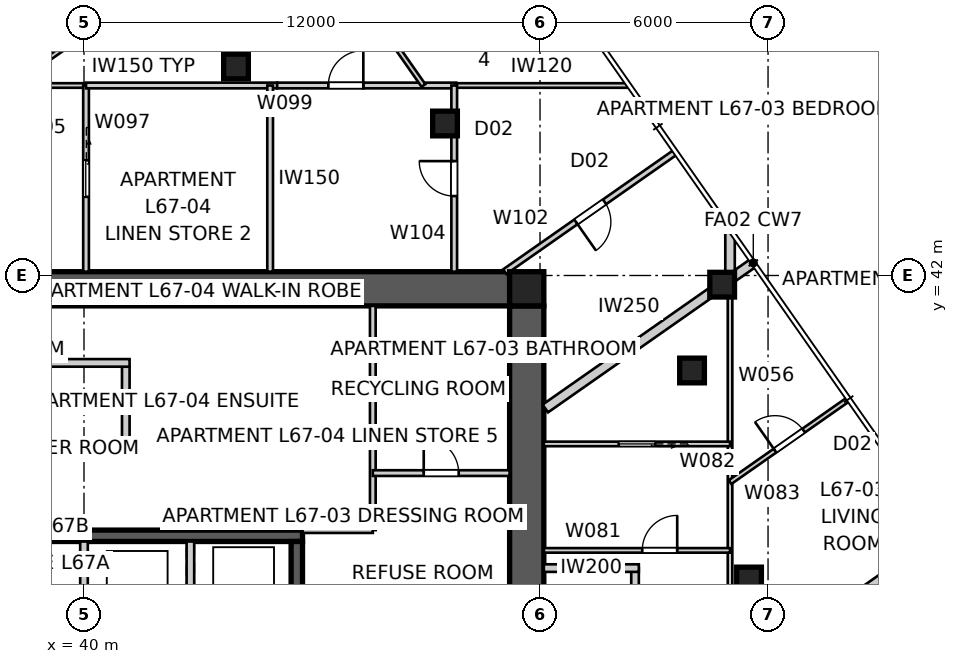
"""IFC4 building model, lengths in metres.
Left out: names, types, materials, properties, quantities, classifications, styles, units other than length and angle.
Written with IfcOpenShell. Run it as: python <this file> out.ifc"""

import sys

from ifc_helpers import new_model, si_unit, direction, frame, frame_2d, origin, origin_2d, place, context, subcontext, project, spatial, polyline, rectangle, outline, extrude, element, fill, save


model = new_model("IFC4")
c1 = context("Model", 3, precision=1e-05, world=origin(), true_north=direction((0.0, 1.0)))
c2 = subcontext(c1, "Body", "Model", "MODEL_VIEW")
j1 = project(units=[si_unit("LENGTHUNIT", "METRE"), si_unit("PLANEANGLEUNIT", "RADIAN")], contexts=[c1])
p1 = place(None, origin())
s1 = spatial("IfcSite", under=j1, at=p1, CompositionType="ELEMENT")
p2 = place(p1, origin())
s2 = spatial("IfcBuilding", under=s1, at=p2, CompositionType="ELEMENT")
p3 = place(p2, frame((0.0, 0.0, 243.8)))
s3 = spatial("IfcBuildingStorey", under=s2, at=p3, CompositionType="ELEMENT", Elevation=243.8)
p4 = place(p3, frame((28.8, 41.65, 0.0), z_axis=(0.0, 0.0, 1.0), x_axis=(1.0, 0.0, 0.0)))
e1 = element("IfcWall", 1, at=p4, inside=s3, PredefinedType="SHEAR", context=c2, shape_type="SweptSolid", body=[
    extrude(outline(polyline([(0.0, -0.45), (22.4, -0.45), (22.4, -0.025), (22.85, -0.025), (22.85, 0.025), (22.4, 0.025), (22.4, 0.45), (0.0, 0.45), (0.0, 0.025), (-0.45, 0.025), (-0.45, -0.025), (0.0, -0.025), (0.0, -0.45)])), origin(), (0.0, 0.0, 1.0), 3.4),
])
p5 = place(p3, frame((51.65, 18.8, 0.0), z_axis=(0.0, 0.0, 1.0), x_axis=(0.0, 1.0, 0.0)))
e2 = element("IfcWall", 2, at=p5, inside=s3, PredefinedType="SHEAR", context=c2, shape_type="SweptSolid", body=[
    extrude(outline(polyline([(0.0, -0.45), (22.4, -0.45), (22.4, -0.025), (22.85, -0.025), (22.85, 0.025), (22.4, 0.025), (22.4, 0.45), (0.0, 0.45), (0.0, 0.025), (-0.45, 0.025), (-0.45, -0.025), (0.0, -0.025), (0.0, -0.45)])), origin(), (0.0, 0.0, 1.0), 3.4),
])
p6 = place(p5, frame((11.14, 0.0, 0.0)))
e3 = element("IfcOpeningElement", 3, at=p6, cuts=e2, PredefinedType="OPENING", context=c2, shape_type="SweptSolid", body=[
    extrude(rectangle(XDim=1.02, YDim=2.4, at=frame_2d((0.51, 1.2))), frame((0.0, 0.46, 0.0), z_axis=(0.0, -1.0, 0.0), x_axis=(1.0, 0.0, 0.0)), (0.0, 0.0, 1.0), 0.92),
])
p7 = place(p3, frame((34.25, 35.15, 0.0), z_axis=(0.0, 0.0, 1.0), x_axis=(1.0, 0.0, 0.0)))
e4 = element("IfcWall", 4, at=p7, inside=s3, PredefinedType="SHEAR", context=c2, shape_type="SweptSolid", body=[
    extrude(rectangle(XDim=11.5, YDim=0.3, at=frame_2d((5.75, 0.0))), origin(), (0.0, 0.0, 1.0), 3.4),
])
for number, where, z_axis, x_axis in (
    (5, (40.0, 32.2, 0.0), (0.0, 0.0, 1.0), (0.0, 1.0, 0.0)),
    (6, (42.8, 32.2, 0.0), (0.0, 0.0, 1.0), (0.0, 1.0, 0.0)),
):
    element("IfcWall", number, at=place(p3, frame(where, z_axis=z_axis, x_axis=x_axis)), inside=s3, PredefinedType="SOLIDWALL", context=c2, shape_type="SweptSolid", body=[
        extrude(rectangle(XDim=2.8, YDim=0.2, at=frame_2d((1.4, 0.0))), origin(), (0.0, 0.0, 1.0), 3.4),
    ])
p8 = place(p3, frame((45.6, 32.2, 0.0), z_axis=(0.0, 0.0, 1.0), x_axis=(0.0, 1.0, 0.0)))
e7 = element("IfcWall", 7, at=p8, inside=s3, PredefinedType="SHEAR", context=c2, shape_type="SweptSolid", body=[
    extrude(rectangle(XDim=2.8, YDim=0.3, at=frame_2d((1.4, 0.0))), origin(), (0.0, 0.0, 1.0), 3.4),
])
p9 = place(p3, frame((41.1, 37.6, 0.0), z_axis=(0.0, 0.0, 1.0), x_axis=(0.0, 1.0, 0.0)))
e8 = element("IfcWall", 8, at=p9, inside=s3, PredefinedType="SOLIDWALL", context=c2, shape_type="SweptSolid", body=[
    extrude(rectangle(XDim=2.0, YDim=0.2, at=frame_2d((1.0, 0.0))), origin(), (0.0, 0.0, 1.0), 3.4),
])
for number, where, z_axis, x_axis in (
    (9, (38.8, 37.5, 0.0), (0.0, 0.0, 1.0), (1.0, 0.0, 0.0)),
    (10, (38.8, 39.7, 0.0), (0.0, 0.0, 1.0), (1.0, 0.0, 0.0)),
):
    element("IfcWall", number, at=place(p3, frame(where, z_axis=z_axis, x_axis=x_axis)), inside=s3, PredefinedType="SOLIDWALL", context=c2, shape_type="SweptSolid", body=[
        extrude(rectangle(XDim=2.4, YDim=0.2, at=frame_2d((1.2, 0.0))), origin(), (0.0, 0.0, 1.0), 3.4),
    ])
p10 = place(p3, frame((51.65, 41.65, 0.0), z_axis=(0.0, 0.0, 1.0), x_axis=(1.0, 0.0, 0.0)))
e11 = element("IfcColumn", 11, at=p10, inside=s3, PredefinedType="COLUMN", context=c2, shape_type="SweptSolid", body=[
    extrude(rectangle(XDim=0.9, YDim=0.9, at=origin_2d()), origin(), (0.0, 0.0, 1.0), 3.4),
])
for number, where, z_axis, x_axis in (
    (12, (56.793, 41.758, 0.0), (0.0, 0.0, 1.0), (1.0, 0.0, 0.0)),
    (13, (57.5, 34.0, 0.0), (0.0, 0.0, 1.0), (1.0, 0.0, 0.0)),
    (14, (56.0, 39.5, 0.0), (0.0, 0.0, 1.0), (1.0, 0.0, 0.0)),
    (15, (49.5, 46.0, 0.0), (0.0, 0.0, 1.0), (1.0, 0.0, 0.0)),
    (16, (44.0, 47.5, 0.0), (0.0, 0.0, 1.0), (1.0, 0.0, 0.0)),
):
    element("IfcColumn", number, at=place(p3, frame(where, z_axis=z_axis, x_axis=x_axis)), inside=s3, PredefinedType="COLUMN", context=c2, shape_type="SweptSolid", body=[
        extrude(rectangle(XDim=0.65, YDim=0.65, at=origin_2d()), origin(), (0.0, 0.0, 1.0), 3.4),
    ])
p11 = place(p3, frame((54.5, 25.7, 0.0), z_axis=(0.0, 0.0, 1.0), x_axis=(0.0, 1.0, 0.0)))
e17 = element("IfcWall", 17, at=p11, inside=s3, PredefinedType="PARTITIONING", context=c2, shape_type="SweptSolid", body=[
    extrude(rectangle(XDim=8.6, YDim=0.2, at=frame_2d((4.3, 0.0))), origin(), (0.0, 0.0, 1.0), 3.25),
])
p12 = place(p11, frame((5.438, 0.0, 0.0)))
e18 = element("IfcOpeningElement", 18, at=p12, cuts=e17, PredefinedType="OPENING", context=c2, shape_type="SweptSolid", body=[
    extrude(rectangle(XDim=1.02, YDim=2.34, at=frame_2d((0.51, 1.17))), frame((0.0, 0.11, 0.0), z_axis=(0.0, -1.0, 0.0), x_axis=(1.0, 0.0, 0.0)), (0.0, 0.0, 1.0), 0.22),
])
p13 = place(p11, frame((1.543, 0.0, 0.0)))
e19 = element("IfcOpeningElement", 19, at=p13, cuts=e17, PredefinedType="OPENING", context=c2, shape_type="SweptSolid", body=[
    extrude(rectangle(XDim=1.02, YDim=2.34, at=frame_2d((0.51, 1.17))), frame((0.0, 0.11, 0.0), z_axis=(0.0, -1.0, 0.0), x_axis=(1.0, 0.0, 0.0)), (0.0, 0.0, 1.0), 0.22),
])
p14 = place(p3, frame((52.1, 34.3, 0.0), z_axis=(0.0, 0.0, 1.0), x_axis=(1.0, 0.0, 0.0)))
e20 = element("IfcWall", 20, at=p14, inside=s3, PredefinedType="PARTITIONING", context=c2, shape_type="SweptSolid", body=[
    extrude(rectangle(XDim=2.5, YDim=0.2, at=frame_2d((1.25, 0.0))), origin(), (0.0, 0.0, 1.0), 3.25),
])
p15 = place(p3, frame((57.612, 42.332, 0.0), z_axis=(0.0, 0.0, 1.0), x_axis=(-0.819161528122, -0.573562891796, 0.0)))
e21 = element("IfcWall", 21, at=p15, inside=s3, PredefinedType="PARTITIONING", context=c2, shape_type="SweptSolid", body=[
    extrude(rectangle(XDim=6.681, YDim=0.25, at=frame_2d((3.341, 0.0))), origin(), (0.0, 0.0, 1.0), 3.25),
])
p16 = place(p3, frame((62.631, 35.164, 0.0), z_axis=(0.0, 0.0, 1.0), x_axis=(-0.81915902312, -0.573566469418, 0.0)))
e22 = element("IfcWall", 22, at=p16, inside=s3, PredefinedType="PARTITIONING", context=c2, shape_type="SweptSolid", body=[
    extrude(rectangle(XDim=9.756, YDim=0.25, at=frame_2d((4.878, 0.0))), origin(), (0.0, 0.0, 1.0), 3.25),
])
p17 = place(p3, frame((47.6, 41.2, 0.0), z_axis=(0.0, 0.0, 1.0), x_axis=(0.0, -1.0, 0.0)))
e23 = element("IfcWall", 23, at=p17, inside=s3, PredefinedType="SOLIDWALL", context=c2, shape_type="SweptSolid", body=[
    extrude(rectangle(XDim=5.9, YDim=0.15, at=frame_2d((2.95, 0.0))), origin(), (0.0, 0.0, 1.0), 3.25),
])
p18 = place(p3, frame((47.6, 35.3, 0.0), z_axis=(0.0, 0.0, 1.0), x_axis=(-1.0, 0.0, 0.0)))
e24 = element("IfcWall", 24, at=p18, inside=s3, PredefinedType="SOLIDWALL", context=c2, shape_type="SweptSolid", body=[
    extrude(rectangle(XDim=1.85, YDim=0.15, at=frame_2d((0.925, 0.0))), origin(), (0.0, 0.0, 1.0), 3.25),
])
p19 = place(p3, frame((47.6, 36.8, 0.0), z_axis=(0.0, 0.0, 1.0), x_axis=(1.0, 0.0, 0.0)))
e25 = element("IfcWall", 25, at=p19, inside=s3, PredefinedType="SOLIDWALL", context=c2, shape_type="SweptSolid", body=[
    extrude(rectangle(XDim=3.6, YDim=0.15, at=frame_2d((1.8, 0.0))), origin(), (0.0, 0.0, 1.0), 3.25),
])
p20 = place(p19, frame((1.34, 0.0, 0.0)))
e26 = element("IfcOpeningElement", 26, at=p20, cuts=e25, PredefinedType="OPENING", context=c2, shape_type="SweptSolid", body=[
    extrude(rectangle(XDim=0.92, YDim=2.1, at=frame_2d((0.46, 1.05))), frame((0.0, 0.085, 0.0), z_axis=(0.0, -1.0, 0.0), x_axis=(1.0, 0.0, 0.0)), (0.0, 0.0, 1.0), 0.17),
])
p21 = place(p3, frame((57.0, 41.904, 0.0), z_axis=(0.0, 0.0, 1.0), x_axis=(0.0, -1.0, 0.0)))
e27 = element("IfcWall", 27, at=p21, inside=s3, PredefinedType="PARTITIONING", context=c2, shape_type="SweptSolid", body=[
    extrude(rectangle(XDim=20.498, YDim=0.12, at=frame_2d((10.249, 0.0))), origin(), (0.0, 0.0, 1.0), 2.55),
])
p22 = place(p21, frame((8.449, 0.0, 0.0)))
e28 = element("IfcOpeningElement", 28, at=p22, cuts=e27, PredefinedType="OPENING", context=c2, shape_type="SweptSolid", body=[
    extrude(rectangle(XDim=0.92, YDim=2.34, at=frame_2d((0.46, 1.17))), frame((0.0, 0.07, 0.0), z_axis=(0.0, -1.0, 0.0), x_axis=(1.0, 0.0, 0.0)), (0.0, 0.0, 1.0), 0.14),
])
p23 = place(p21, frame((11.574, 0.0, 0.0)))
e29 = element("IfcOpeningElement", 29, at=p23, cuts=e27, PredefinedType="OPENING", context=c2, shape_type="SweptSolid", body=[
    extrude(rectangle(XDim=0.92, YDim=2.34, at=frame_2d((0.46, 1.17))), frame((0.0, 0.07, 0.0), z_axis=(0.0, -1.0, 0.0), x_axis=(1.0, 0.0, 0.0)), (0.0, 0.0, 1.0), 0.14),
])
p24 = place(p21, frame((18.432, 0.0, 0.0)))
e30 = element("IfcOpeningElement", 30, at=p24, cuts=e27, PredefinedType="OPENING", context=c2, shape_type="SweptSolid", body=[
    extrude(rectangle(XDim=0.92, YDim=2.34, at=frame_2d((0.46, 1.17))), frame((0.0, 0.07, 0.0), z_axis=(0.0, -1.0, 0.0), x_axis=(1.0, 0.0, 0.0)), (0.0, 0.0, 1.0), 0.14),
])
p25 = place(p3, frame((52.1, 34.766, 0.0), z_axis=(0.0, 0.0, 1.0), x_axis=(1.0, 0.0, 0.0)))
e31 = element("IfcWall", 31, at=p25, inside=s3, PredefinedType="PARTITIONING", context=c2, shape_type="SweptSolid", body=[
    extrude(rectangle(XDim=4.9, YDim=0.12, at=frame_2d((2.45, 0.0))), origin(), (0.0, 0.0, 1.0), 3.25),
])
p26 = place(p25, frame((2.59, 0.0, 0.0)))
e32 = element("IfcOpeningElement", 32, at=p26, cuts=e31, PredefinedType="OPENING", context=c2, shape_type="SweptSolid", body=[
    extrude(rectangle(XDim=0.92, YDim=2.34, at=frame_2d((0.46, 1.17))), frame((0.0, 0.07, 0.0), z_axis=(0.0, -1.0, 0.0), x_axis=(1.0, 0.0, 0.0)), (0.0, 0.0, 1.0), 0.14),
])
p27 = place(p3, frame((57.0, 37.568, 0.0), z_axis=(0.0, 0.0, 1.0), x_axis=(-1.0, 0.0, 0.0)))
e33 = element("IfcWall", 33, at=p27, inside=s3, PredefinedType="PARTITIONING", context=c2, shape_type="SweptSolid", body=[
    extrude(rectangle(XDim=4.9, YDim=0.12, at=frame_2d((2.45, 0.0))), origin(), (0.0, 0.0, 1.0), 3.25),
])
p28 = place(p27, frame((1.97, 0.0, 0.0)))
e34 = element("IfcOpeningElement", 34, at=p28, cuts=e33, PredefinedType="OPENING", context=c2, shape_type="SweptSolid", body=[
    extrude(rectangle(XDim=0.96, YDim=2.1, at=frame_2d((0.48, 1.05))), frame((0.0, 0.07, 0.0), z_axis=(0.0, -1.0, 0.0), x_axis=(1.0, 0.0, 0.0)), (0.0, 0.0, 1.0), 0.14),
])
p29 = place(p3, frame((57.0, 36.562, 0.0), z_axis=(0.0, 0.0, 1.0), x_axis=(0.819140645834, 0.573592714688, 0.0)))
e35 = element("IfcWall", 35, at=p29, inside=s3, PredefinedType="PARTITIONING", context=c2, shape_type="SweptSolid", body=[
    extrude(rectangle(XDim=3.77, YDim=0.12, at=frame_2d((1.885, 0.0))), origin(), (0.0, 0.0, 1.0), 3.25),
])
p30 = place(p29, frame((1.445, 0.0, 0.0)))
e36 = element("IfcOpeningElement", 36, at=p30, cuts=e35, PredefinedType="OPENING", context=c2, shape_type="SweptSolid", body=[
    extrude(rectangle(XDim=0.92, YDim=2.34, at=frame_2d((0.46, 1.17))), frame((0.0, 0.07, 0.0), z_axis=(0.0, -1.0, 0.0), x_axis=(1.0, 0.0, 0.0)), (0.0, 0.0, 1.0), 0.14),
])
p31 = place(p3, frame((57.0, 41.919, 0.0), z_axis=(0.0, 0.0, 1.0), x_axis=(0.0, 1.0, 0.0)))
e37 = element("IfcWall", 37, at=p31, inside=s3, PredefinedType="PARTITIONING", context=c2, shape_type="SweptSolid", body=[
    extrude(rectangle(XDim=1.217, YDim=0.25, at=frame_2d((0.608, 0.0))), origin(), (0.0, 0.0, 1.0), 3.25),
])
p32 = place(p3, frame((28.708, 47.0, 0.0), z_axis=(0.0, 0.0, 1.0), x_axis=(1.0, 0.0, 0.0)))
e38 = element("IfcWall", 38, at=p32, inside=s3, PredefinedType="PARTITIONING", context=c2, shape_type="SweptSolid", body=[
    extrude(rectangle(XDim=11.346, YDim=0.12, at=frame_2d((5.673, 0.0))), origin(), (0.0, 0.0, 1.0), 2.55),
])
p33 = place(p32, frame((0.477, 0.0, 0.0)))
e39 = element("IfcOpeningElement", 39, at=p33, cuts=e38, PredefinedType="OPENING", context=c2, shape_type="SweptSolid", body=[
    extrude(rectangle(XDim=0.92, YDim=2.34, at=frame_2d((0.46, 1.17))), frame((0.0, 0.07, 0.0), z_axis=(0.0, -1.0, 0.0), x_axis=(1.0, 0.0, 0.0)), (0.0, 0.0, 1.0), 0.14),
])
p34 = place(p3, frame((40.054, 47.0, 0.0), z_axis=(0.0, 0.0, 1.0), x_axis=(0.0, -1.0, 0.0)))
e40 = element("IfcWall", 40, at=p34, inside=s3, PredefinedType="SOLIDWALL", context=c2, shape_type="SweptSolid", body=[
    extrude(rectangle(XDim=4.9, YDim=0.15, at=frame_2d((2.45, 0.0))), origin(), (0.0, 0.0, 1.0), 2.796),
])
p35 = place(p34, frame((1.97, 0.0, 0.0)))
e41 = element("IfcOpeningElement", 41, at=p35, cuts=e40, PredefinedType="OPENING", context=c2, shape_type="SweptSolid", body=[
    extrude(rectangle(XDim=0.96, YDim=2.1, at=frame_2d((0.48, 1.05))), frame((0.0, 0.085, 0.0), z_axis=(0.0, -1.0, 0.0), x_axis=(1.0, 0.0, 0.0)), (0.0, 0.0, 1.0), 0.17),
])
p36 = place(p3, frame((40.054, 47.0, 0.0), z_axis=(0.0, 0.0, 1.0), x_axis=(1.0, 0.0, 0.0)))
e42 = element("IfcWall", 42, at=p36, inside=s3, PredefinedType="SOLIDWALL", context=c2, shape_type="SweptSolid", body=[
    extrude(rectangle(XDim=5.029, YDim=0.15, at=frame_2d((2.515, 0.0))), origin(), (0.0, 0.0, 1.0), 3.25),
])
p37 = place(p3, frame((45.083, 47.0, 0.0), z_axis=(0.0, 0.0, 1.0), x_axis=(1.0, 0.0, 0.0)))
e43 = element("IfcWall", 43, at=p37, inside=s3, PredefinedType="SOLIDWALL", context=c2, shape_type="SweptSolid", body=[
    extrude(rectangle(XDim=2.267, YDim=0.15, at=frame_2d((1.133, 0.0))), origin(), (0.0, 0.0, 1.0), 2.55),
])
p38 = place(p37, frame((1.347, 0.0, 0.0)))
e44 = element("IfcOpeningElement", 44, at=p38, cuts=e43, PredefinedType="OPENING", context=c2, shape_type="SweptSolid", body=[
    extrude(rectangle(XDim=0.92, YDim=2.34, at=frame_2d((0.46, 1.17))), frame((0.0, 0.085, 0.0), z_axis=(0.0, -1.0, 0.0), x_axis=(1.0, 0.0, 0.0)), (0.0, 0.0, 1.0), 0.17),
])
p39 = place(p3, frame((47.35, 47.0, 0.0), z_axis=(0.0, 0.0, 1.0), x_axis=(1.0, 0.0, 0.0)))
e45 = element("IfcWall", 45, at=p39, inside=s3, PredefinedType="SOLIDWALL", context=c2, shape_type="SweptSolid", body=[
    extrude(rectangle(XDim=2.442, YDim=0.15, at=frame_2d((1.221, 0.0))), origin(), (0.0, 0.0, 1.0), 3.25),
])
p40 = place(p3, frame((44.898, 47.0, 0.0), z_axis=(0.0, 0.0, 1.0), x_axis=(0.0, -1.0, 0.0)))
e46 = element("IfcWall", 46, at=p40, inside=s3, PredefinedType="SOLIDWALL", context=c2, shape_type="SweptSolid", body=[
    extrude(rectangle(XDim=4.9, YDim=0.15, at=frame_2d((2.45, 0.0))), origin(), (0.0, 0.0, 1.0), 3.25),
])
p41 = place(p3, frame((55.537, 45.226, 0.0), z_axis=(0.0, 0.0, 1.0), x_axis=(-0.819158250207, -0.573567573279, 0.0)))
e47 = element("IfcWall", 47, at=p41, inside=s3, PredefinedType="SOLIDWALL", context=c2, shape_type="SweptSolid", body=[
    extrude(rectangle(XDim=5.45, YDim=0.15, at=frame_2d((2.725, 0.0))), origin(), (0.0, 0.0, 1.0), 3.25),
])
p42 = place(p41, frame((2.245, 0.0, 0.0)))
e48 = element("IfcOpeningElement", 48, at=p42, cuts=e47, PredefinedType="OPENING", context=c2, shape_type="SweptSolid", body=[
    extrude(rectangle(XDim=0.92, YDim=2.34, at=frame_2d((0.46, 1.17))), frame((0.0, 0.085, 0.0), z_axis=(0.0, -1.0, 0.0), x_axis=(1.0, 0.0, 0.0)), (0.0, 0.0, 1.0), 0.17),
])
p43 = place(p3, frame((49.792, 47.0, 0.0), z_axis=(0.0, 0.0, 1.0), x_axis=(1.0, 0.0, 0.0)))
e49 = element("IfcWall", 49, at=p43, inside=s3, PredefinedType="PARTITIONING", context=c2, shape_type="SweptSolid", body=[
    extrude(rectangle(XDim=4.502, YDim=0.12, at=frame_2d((2.251, 0.0))), origin(), (0.0, 0.0, 1.0), 3.25),
])
p44 = place(p3, frame((49.742, 42.1, 0.0), z_axis=(0.0, 0.0, 1.0), x_axis=(0.0, 1.0, 0.0)))
e50 = element("IfcWall", 50, at=p44, inside=s3, PredefinedType="SOLIDWALL", context=c2, shape_type="SweptSolid", body=[
    extrude(rectangle(XDim=4.9, YDim=0.15, at=frame_2d((2.45, 0.0))), origin(), (0.0, 0.0, 1.0), 3.25),
])
p45 = place(p44, frame((1.99, 0.0, 0.0)))
e51 = element("IfcOpeningElement", 51, at=p45, cuts=e50, PredefinedType="OPENING", context=c2, shape_type="SweptSolid", body=[
    extrude(rectangle(XDim=0.92, YDim=2.34, at=frame_2d((0.46, 1.17))), frame((0.0, 0.085, 0.0), z_axis=(0.0, -1.0, 0.0), x_axis=(1.0, 0.0, 0.0)), (0.0, 0.0, 1.0), 0.17),
])
p46 = place(p3, frame((48.949, 54.633, 0.0), z_axis=(0.0, 0.0, 1.0), x_axis=(-0.819155207289, -0.573571919092, 0.0)))
e52 = element("IfcWall", 52, at=p46, inside=s3, PredefinedType="PARTITIONING", context=c2, shape_type="SweptSolid", body=[
    extrude(rectangle(XDim=12.71, YDim=0.12, at=frame_2d((6.355, 0.0))), origin(), (0.0, 0.0, 1.0), 3.25),
])
p47 = place(p46, frame((8.066, 0.0, 0.0)))
e53 = element("IfcOpeningElement", 53, at=p47, cuts=e52, PredefinedType="OPENING", context=c2, shape_type="SweptSolid", body=[
    extrude(rectangle(XDim=0.92, YDim=2.34, at=frame_2d((0.46, 1.17))), frame((0.0, 0.07, 0.0), z_axis=(0.0, -1.0, 0.0), x_axis=(1.0, 0.0, 0.0)), (0.0, 0.0, 1.0), 0.14),
])
p48 = place(p46, frame((1.741, 0.0, 0.0)))
e54 = element("IfcOpeningElement", 54, at=p48, cuts=e52, PredefinedType="OPENING", context=c2, shape_type="SweptSolid", body=[
    extrude(rectangle(XDim=0.92, YDim=2.34, at=frame_2d((0.46, 1.17))), frame((0.0, 0.07, 0.0), z_axis=(0.0, -1.0, 0.0), x_axis=(1.0, 0.0, 0.0)), (0.0, 0.0, 1.0), 0.14),
])
p49 = place(p3, frame((48.932, 47.0, 0.0), z_axis=(0.0, 0.0, 1.0), x_axis=(-0.573569946952, 0.819156588177, 0.0)))
e55 = element("IfcWall", 55, at=p49, inside=s3, PredefinedType="PARTITIONING", context=c2, shape_type="SweptSolid", body=[
    extrude(rectangle(XDim=6.243, YDim=0.12, at=frame_2d((3.122, 0.0))), origin(), (0.0, 0.0, 1.0), 3.25),
])
p50 = place(p20, origin())
e56 = element("IfcDoor", 56, at=p50, inside=s3, OperationType="SINGLE_SWING_LEFT", PredefinedType="DOOR", context=c2, shape_type="SweptSolid", body=[
    extrude(rectangle(XDim=0.92, YDim=2.1, at=frame_2d((0.46, 1.05))), frame((0.0, 0.025, 0.0), z_axis=(0.0, -1.0, 0.0), x_axis=(1.0, 0.0, 0.0)), (0.0, 0.0, 1.0), 0.05),
])
fill(e26, e56)
p51 = place(p26, origin())
e57 = element("IfcDoor", 57, at=p51, inside=s3, OperationType="SINGLE_SWING_RIGHT", PredefinedType="DOOR", context=c2, shape_type="SweptSolid", body=[
    extrude(rectangle(XDim=0.92, YDim=2.34, at=frame_2d((0.46, 1.17))), frame((0.0, 0.025, 0.0), z_axis=(0.0, -1.0, 0.0), x_axis=(1.0, 0.0, 0.0)), (0.0, 0.0, 1.0), 0.05),
])
fill(e32, e57)
p52 = place(p28, origin())
e58 = element("IfcDoor", 58, at=p52, inside=s3, OperationType="SLIDING_TO_LEFT", PredefinedType="DOOR", context=c2, shape_type="SweptSolid", body=[
    extrude(rectangle(XDim=0.96, YDim=2.1, at=frame_2d((0.48, 1.05))), frame((0.0, 0.025, 0.0), z_axis=(0.0, -1.0, 0.0), x_axis=(1.0, 0.0, 0.0)), (0.0, 0.0, 1.0), 0.05),
])
fill(e34, e58)
p53 = place(p30, origin())
e59 = element("IfcDoor", 59, at=p53, inside=s3, OperationType="SINGLE_SWING_LEFT", PredefinedType="DOOR", context=c2, shape_type="SweptSolid", body=[
    extrude(rectangle(XDim=0.92, YDim=2.34, at=frame_2d((0.46, 1.17))), frame((0.0, 0.025, 0.0), z_axis=(0.0, -1.0, 0.0), x_axis=(1.0, 0.0, 0.0)), (0.0, 0.0, 1.0), 0.05),
])
fill(e36, e59)
p54 = place(p35, origin())
e60 = element("IfcDoor", 60, at=p54, inside=s3, OperationType="SLIDING_TO_LEFT", PredefinedType="DOOR", context=c2, shape_type="SweptSolid", body=[
    extrude(rectangle(XDim=0.96, YDim=2.1, at=frame_2d((0.48, 1.05))), frame((0.0, 0.025, 0.0), z_axis=(0.0, -1.0, 0.0), x_axis=(1.0, 0.0, 0.0)), (0.0, 0.0, 1.0), 0.05),
])
fill(e41, e60)
p55 = place(p38, origin())
e61 = element("IfcDoor", 61, at=p55, inside=s3, OperationType="SINGLE_SWING_RIGHT", PredefinedType="DOOR", context=c2, shape_type="SweptSolid", body=[
    extrude(rectangle(XDim=0.92, YDim=2.34, at=frame_2d((0.46, 1.17))), frame((0.0, 0.025, 0.0), z_axis=(0.0, -1.0, 0.0), x_axis=(1.0, 0.0, 0.0)), (0.0, 0.0, 1.0), 0.05),
])
fill(e44, e61)
p56 = place(p45, origin())
e62 = element("IfcDoor", 62, at=p56, inside=s3, OperationType="SINGLE_SWING_RIGHT", PredefinedType="DOOR", context=c2, shape_type="SweptSolid", body=[
    extrude(rectangle(XDim=0.92, YDim=2.34, at=frame_2d((0.46, 1.17))), frame((0.0, 0.025, 0.0), z_axis=(0.0, -1.0, 0.0), x_axis=(1.0, 0.0, 0.0)), (0.0, 0.0, 1.0), 0.05),
])
fill(e51, e62)
p57 = place(p42, origin())
e63 = element("IfcDoor", 63, at=p57, inside=s3, OperationType="SINGLE_SWING_RIGHT", PredefinedType="DOOR", context=c2, shape_type="SweptSolid", body=[
    extrude(rectangle(XDim=0.92, YDim=2.34, at=frame_2d((0.46, 1.17))), frame((0.0, 0.025, 0.0), z_axis=(0.0, -1.0, 0.0), x_axis=(1.0, 0.0, 0.0)), (0.0, 0.0, 1.0), 0.05),
])
fill(e48, e63)
save(model, sys.argv[1])
